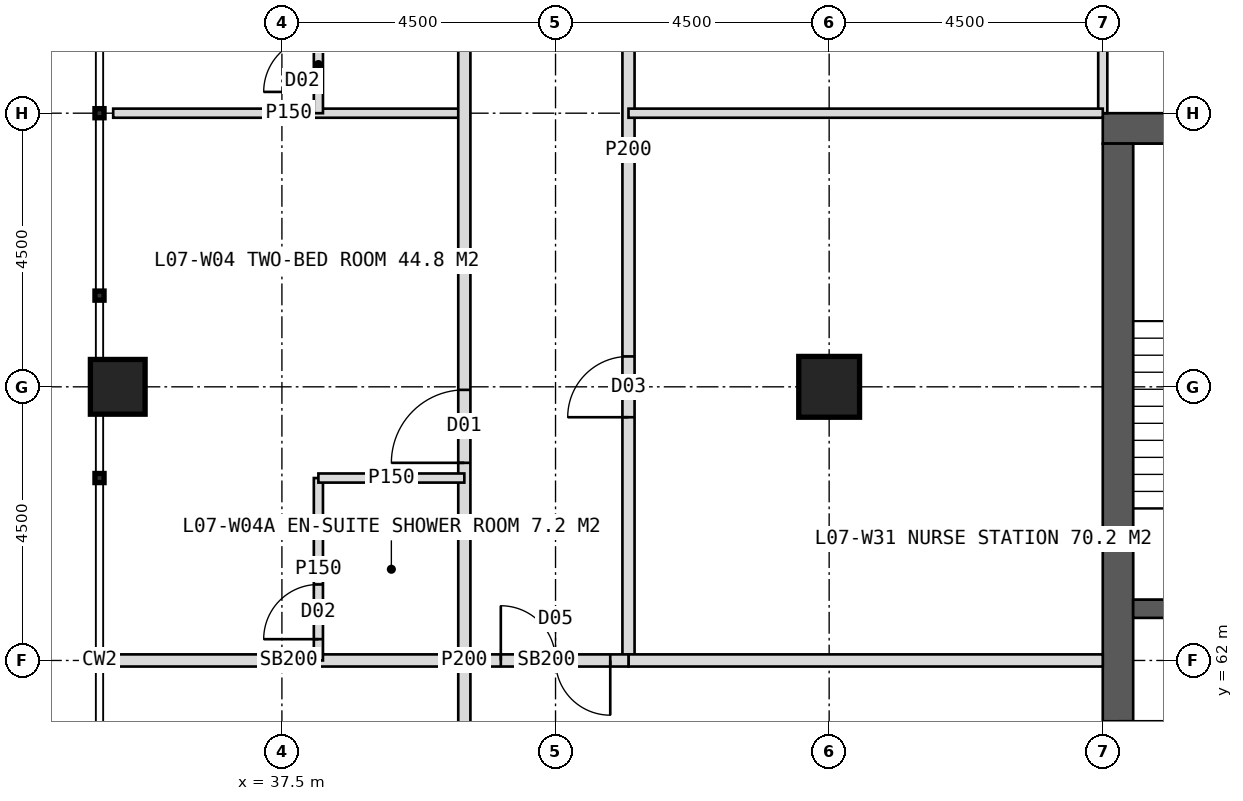
"""IFC4 building model, lengths in metres.
Left out: names, types, materials, properties, quantities, classifications, styles, units other than length and angle.
Written with IfcOpenShell. Run it as: python <this file> out.ifc"""

import sys

from ifc_helpers import new_model, si_unit, direction, frame, frame_2d, origin, origin_2d, place, context, subcontext, project, spatial, rectangle, hollow_rectangle, extrude, element, fill, save


model = new_model("IFC4")
c1 = context("Model", 3, precision=1e-05, world=origin(), true_north=direction((0.0, 1.0)))
c2 = subcontext(c1, "Body", "Model", "MODEL_VIEW")
j1 = project(units=[si_unit("LENGTHUNIT", "METRE"), si_unit("PLANEANGLEUNIT", "RADIAN")], contexts=[c1])
p1 = place(None, origin())
s1 = spatial("IfcSite", under=j1, at=p1, CompositionType="ELEMENT")
p2 = place(p1, origin())
s2 = spatial("IfcBuilding", under=s1, at=p2, CompositionType="ELEMENT")
p3 = place(p2, frame((0.0, 0.0, 35.0)))
s3 = spatial("IfcBuildingStorey", under=s2, at=p3, CompositionType="ELEMENT", Elevation=35.0)
p4 = place(p3, frame((51.0, 70.75, 0.0), z_axis=(0.0, 0.0, 1.0), x_axis=(1.0, 0.0, 0.0)))
e1 = element("IfcWall", 1, at=p4, inside=s3, PredefinedType="SHEAR", context=c2, shape_type="SweptSolid", body=[
    extrude(rectangle(XDim=18.0, YDim=0.5, at=frame_2d((9.0, 0.0))), origin(), (0.0, 0.0, 1.0), 4.0),
])
p5 = place(p4, frame((8.1, 0.0, 0.0)))
e2 = element("IfcOpeningElement", 2, at=p5, cuts=e1, PredefinedType="OPENING", context=c2, shape_type="SweptSolid", body=[
    extrude(rectangle(XDim=1.8, YDim=2.2, at=frame_2d((0.9, 1.1))), frame((0.0, 0.26, 0.0), z_axis=(0.0, -1.0, 0.0), x_axis=(1.0, 0.0, 0.0)), (0.0, 0.0, 1.0), 0.52),
])
p6 = place(p3, frame((51.25, 53.5, 0.0), z_axis=(0.0, 0.0, 1.0), x_axis=(0.0, 1.0, 0.0)))
e3 = element("IfcWall", 3, at=p6, inside=s3, PredefinedType="SHEAR", context=c2, shape_type="SweptSolid", body=[
    extrude(rectangle(XDim=17.0, YDim=0.5, at=frame_2d((8.5, 0.0))), origin(), (0.0, 0.0, 1.0), 4.0),
])
p7 = place(p6, frame((6.0, 0.0, 0.0)))
e4 = element("IfcOpeningElement", 4, at=p7, cuts=e3, PredefinedType="OPENING", context=c2, shape_type="SweptSolid", body=[
    extrude(rectangle(XDim=1.5, YDim=2.2, at=frame_2d((0.75, 1.1))), frame((0.0, 0.26, 0.0), z_axis=(0.0, -1.0, 0.0), x_axis=(1.0, 0.0, 0.0)), (0.0, 0.0, 1.0), 0.52),
])
p8 = place(p3, frame((51.5, 62.85, 0.0), z_axis=(0.0, 0.0, 1.0), x_axis=(1.0, 0.0, 0.0)))
e5 = element("IfcWall", 5, at=p8, inside=s3, PredefinedType="SHEAR", context=c2, shape_type="SweptSolid", body=[
    extrude(rectangle(XDim=3.3, YDim=0.3, at=frame_2d((1.65, 0.0))), origin(), (0.0, 0.0, 1.0), 4.0),
])
p9 = place(p8, frame((1.05, 0.0, 0.0)))
e6 = element("IfcOpeningElement", 6, at=p9, cuts=e5, PredefinedType="OPENING", context=c2, shape_type="SweptSolid", body=[
    extrude(rectangle(XDim=1.2, YDim=2.1, at=frame_2d((0.6, 1.05))), frame((0.0, 0.16, 0.0), z_axis=(0.0, -1.0, 0.0), x_axis=(1.0, 0.0, 0.0)), (0.0, 0.0, 1.0), 0.32),
])
p10 = place(p3, frame((46.5, 66.5, 0.0), z_axis=(0.0, 0.0, 1.0), x_axis=(1.0, 0.0, 0.0)))
e7 = element("IfcColumn", 7, at=p10, inside=s3, PredefinedType="COLUMN", context=c2, shape_type="SweptSolid", body=[
    extrude(hollow_rectangle(XDim=1.0, YDim=1.0, WallThickness=0.1, at=origin_2d()), origin(), (0.0, 0.0, 1.0), 4.0),
])
p11 = place(p3, frame((34.8, 66.5, 0.0), z_axis=(0.0, 0.0, 1.0), x_axis=(1.0, 0.0, 0.0)))
e8 = element("IfcColumn", 8, at=p11, inside=s3, PredefinedType="COLUMN", context=c2, shape_type="SweptSolid", body=[
    extrude(hollow_rectangle(XDim=0.9, YDim=0.9, WallThickness=0.08, at=origin_2d()), origin(), (0.0, 0.0, 1.0), 4.0),
])
p12 = place(p3, frame((51.0, 71.0, 0.0), z_axis=(0.0, 0.0, 1.0), x_axis=(0.0, 1.0, 0.0)))
e9 = element("IfcWall", 9, at=p12, inside=s3, PredefinedType="PARTITIONING", context=c2, shape_type="SweptSolid", body=[
    extrude(rectangle(XDim=7.8, YDim=0.15, at=frame_2d((3.9, 0.0))), origin(), (0.0, 0.0, 1.0), 3.75),
])
p13 = place(p3, frame((40.5, 62.0, 0.0), z_axis=(0.0, 0.0, 1.0), x_axis=(-1.0, 0.0, 0.0)))
e10 = element("IfcWall", 10, at=p13, inside=s3, PredefinedType="SOLIDWALL", context=c2, shape_type="SweptSolid", body=[
    extrude(rectangle(XDim=5.775, YDim=0.2, at=frame_2d((2.887, 0.0))), origin(), (0.0, 0.0, 1.0), 2.75),
])
p14 = place(p3, frame((40.5, 71.0, 0.0), z_axis=(0.0, 0.0, 1.0), x_axis=(-1.0, 0.0, 0.0)))
e11 = element("IfcWall", 11, at=p14, inside=s3, PredefinedType="PARTITIONING", context=c2, shape_type="SweptSolid", body=[
    extrude(rectangle(XDim=5.775, YDim=0.15, at=frame_2d((2.887, 0.0))), origin(), (0.0, 0.0, 1.0), 3.75),
])
p15 = place(p3, frame((40.5, 42.5, 0.0), z_axis=(0.0, 0.0, 1.0), x_axis=(0.0, 1.0, 0.0)))
e12 = element("IfcWall", 12, at=p15, inside=s3, PredefinedType="PARTITIONING", context=c2, shape_type="SweptSolid", body=[
    extrude(rectangle(XDim=39.0, YDim=0.2, at=frame_2d((19.5, 0.0))), origin(), (0.0, 0.0, 1.0), 3.75),
])
p16 = place(p15, frame((3.25, 0.0, 0.0)))
e13 = element("IfcOpeningElement", 13, at=p16, cuts=e12, PredefinedType="OPENING", context=c2, shape_type="SweptSolid", body=[
    extrude(rectangle(XDim=1.2, YDim=2.2, at=frame_2d((0.6, 1.1))), frame((0.0, 0.11, 0.0), z_axis=(0.0, -1.0, 0.0), x_axis=(1.0, 0.0, 0.0)), (0.0, 0.0, 1.0), 0.22),
])
p17 = place(p15, frame((10.15, 0.0, 0.0)))
e14 = element("IfcOpeningElement", 14, at=p17, cuts=e12, PredefinedType="OPENING", context=c2, shape_type="SweptSolid", body=[
    extrude(rectangle(XDim=1.2, YDim=2.2, at=frame_2d((0.6, 1.1))), frame((0.0, 0.11, 0.0), z_axis=(0.0, -1.0, 0.0), x_axis=(1.0, 0.0, 0.0)), (0.0, 0.0, 1.0), 0.22),
])
p18 = place(p15, frame((16.15, 0.0, 0.0)))
e15 = element("IfcOpeningElement", 15, at=p18, cuts=e12, PredefinedType="OPENING", context=c2, shape_type="SweptSolid", body=[
    extrude(rectangle(XDim=1.2, YDim=2.2, at=frame_2d((0.6, 1.1))), frame((0.0, 0.11, 0.0), z_axis=(0.0, -1.0, 0.0), x_axis=(1.0, 0.0, 0.0)), (0.0, 0.0, 1.0), 0.22),
])
p19 = place(p15, frame((22.75, 0.0, 0.0)))
e16 = element("IfcOpeningElement", 16, at=p19, cuts=e12, PredefinedType="OPENING", context=c2, shape_type="SweptSolid", body=[
    extrude(rectangle(XDim=1.2, YDim=2.2, at=frame_2d((0.6, 1.1))), frame((0.0, 0.11, 0.0), z_axis=(0.0, -1.0, 0.0), x_axis=(1.0, 0.0, 0.0)), (0.0, 0.0, 1.0), 0.22),
])
p20 = place(p15, frame((31.15, 0.0, 0.0)))
e17 = element("IfcOpeningElement", 17, at=p20, cuts=e12, PredefinedType="OPENING", context=c2, shape_type="SweptSolid", body=[
    extrude(rectangle(XDim=1.2, YDim=2.2, at=frame_2d((0.6, 1.1))), frame((0.0, 0.11, 0.0), z_axis=(0.0, -1.0, 0.0), x_axis=(1.0, 0.0, 0.0)), (0.0, 0.0, 1.0), 0.22),
])
p21 = place(p3, frame((38.1, 62.0, 0.0), z_axis=(0.0, 0.0, 1.0), x_axis=(0.0, 1.0, 0.0)))
e18 = element("IfcWall", 18, at=p21, inside=s3, PredefinedType="PARTITIONING", context=c2, shape_type="SweptSolid", body=[
    extrude(rectangle(XDim=3.0, YDim=0.15, at=frame_2d((1.5, 0.0))), origin(), (0.0, 0.0, 1.0), 3.75),
])
p22 = place(p21, frame((0.35, 0.0, 0.0)))
e19 = element("IfcOpeningElement", 19, at=p22, cuts=e18, PredefinedType="OPENING", context=c2, shape_type="SweptSolid", body=[
    extrude(rectangle(XDim=0.9, YDim=2.1, at=frame_2d((0.45, 1.05))), frame((0.0, 0.085, 0.0), z_axis=(0.0, -1.0, 0.0), x_axis=(1.0, 0.0, 0.0)), (0.0, 0.0, 1.0), 0.17),
])
p23 = place(p3, frame((40.5, 65.0, 0.0), z_axis=(0.0, 0.0, 1.0), x_axis=(-1.0, 0.0, 0.0)))
e20 = element("IfcWall", 20, at=p23, inside=s3, PredefinedType="PARTITIONING", context=c2, shape_type="SweptSolid", body=[
    extrude(rectangle(XDim=2.4, YDim=0.15, at=frame_2d((1.2, 0.0))), origin(), (0.0, 0.0, 1.0), 3.75),
])
p24 = place(p3, frame((38.1, 71.0, 0.0), z_axis=(0.0, 0.0, 1.0), x_axis=(0.0, 1.0, 0.0)))
e21 = element("IfcWall", 21, at=p24, inside=s3, PredefinedType="PARTITIONING", context=c2, shape_type="SweptSolid", body=[
    extrude(rectangle(XDim=2.4, YDim=0.15, at=frame_2d((1.2, 0.0))), origin(), (0.0, 0.0, 1.0), 3.75),
])
p25 = place(p24, frame((0.35, 0.0, 0.0)))
e22 = element("IfcOpeningElement", 22, at=p25, cuts=e21, PredefinedType="OPENING", context=c2, shape_type="SweptSolid", body=[
    extrude(rectangle(XDim=0.9, YDim=2.1, at=frame_2d((0.45, 1.05))), frame((0.0, 0.085, 0.0), z_axis=(0.0, -1.0, 0.0), x_axis=(1.0, 0.0, 0.0)), (0.0, 0.0, 1.0), 0.17),
])
p26 = place(p3, frame((43.2, 62.0, 0.0), z_axis=(0.0, 0.0, 1.0), x_axis=(0.0, 1.0, 0.0)))
e23 = element("IfcWall", 23, at=p26, inside=s3, PredefinedType="PARTITIONING", context=c2, shape_type="SweptSolid", body=[
    extrude(rectangle(XDim=16.8, YDim=0.2, at=frame_2d((8.4, 0.0))), origin(), (0.0, 0.0, 1.0), 3.75),
])
p27 = place(p26, frame((4.0, 0.0, 0.0)))
e24 = element("IfcOpeningElement", 24, at=p27, cuts=e23, PredefinedType="OPENING", context=c2, shape_type="SweptSolid", body=[
    extrude(rectangle(XDim=1.0, YDim=2.1, at=frame_2d((0.5, 1.05))), frame((0.0, 0.11, 0.0), z_axis=(0.0, -1.0, 0.0), x_axis=(1.0, 0.0, 0.0)), (0.0, 0.0, 1.0), 0.22),
])
p28 = place(p26, frame((12.4, 0.0, 0.0)))
e25 = element("IfcOpeningElement", 25, at=p28, cuts=e23, PredefinedType="OPENING", context=c2, shape_type="SweptSolid", body=[
    extrude(rectangle(XDim=1.0, YDim=2.1, at=frame_2d((0.5, 1.05))), frame((0.0, 0.11, 0.0), z_axis=(0.0, -1.0, 0.0), x_axis=(1.0, 0.0, 0.0)), (0.0, 0.0, 1.0), 0.22),
])
p29 = place(p3, frame((51.0, 62.0, 0.0), z_axis=(0.0, 0.0, 1.0), x_axis=(-1.0, 0.0, 0.0)))
e26 = element("IfcWall", 26, at=p29, inside=s3, PredefinedType="SOLIDWALL", context=c2, shape_type="SweptSolid", body=[
    extrude(rectangle(XDim=7.8, YDim=0.2, at=frame_2d((3.9, 0.0))), origin(), (0.0, 0.0, 1.0), 2.75),
])
p30 = place(p3, frame((51.0, 71.0, 0.0), z_axis=(0.0, 0.0, 1.0), x_axis=(-1.0, 0.0, 0.0)))
e27 = element("IfcWall", 27, at=p30, inside=s3, PredefinedType="PARTITIONING", context=c2, shape_type="SweptSolid", body=[
    extrude(rectangle(XDim=7.8, YDim=0.15, at=frame_2d((3.9, 0.0))), origin(), (0.0, 0.0, 1.0), 3.75),
])
p31 = place(p3, frame((43.2, 62.0, 0.0), z_axis=(0.0, 0.0, 1.0), x_axis=(-1.0, 0.0, 0.0)))
e28 = element("IfcWall", 28, at=p31, inside=s3, PredefinedType="SOLIDWALL", context=c2, shape_type="SweptSolid", body=[
    extrude(rectangle(XDim=2.7, YDim=0.2, at=frame_2d((1.35, 0.0))), origin(), (0.0, 0.0, 1.0), 2.75),
])
p32 = place(p31, frame((0.3, 0.0, 0.0)))
e29 = element("IfcOpeningElement", 29, at=p32, cuts=e28, PredefinedType="OPENING", context=c2, shape_type="SweptSolid", body=[
    extrude(rectangle(XDim=1.8, YDim=2.2, at=frame_2d((0.9, 1.1))), frame((0.0, 0.11, 0.0), z_axis=(0.0, -1.0, 0.0), x_axis=(1.0, 0.0, 0.0)), (0.0, 0.0, 1.0), 0.22),
])
p33 = place(p19, origin())
e30 = element("IfcDoor", 30, at=p33, inside=s3, OperationType="SINGLE_SWING_LEFT", PredefinedType="DOOR", context=c2, shape_type="SweptSolid", body=[
    extrude(rectangle(XDim=1.2, YDim=2.2, at=frame_2d((0.6, 1.1))), frame((0.0, 0.025, 0.0), z_axis=(0.0, -1.0, 0.0), x_axis=(1.0, 0.0, 0.0)), (0.0, 0.0, 1.0), 0.05),
])
fill(e16, e30)
p34 = place(p22, origin())
e31 = element("IfcDoor", 31, at=p34, inside=s3, OperationType="SINGLE_SWING_LEFT", PredefinedType="DOOR", context=c2, shape_type="SweptSolid", body=[
    extrude(rectangle(XDim=0.9, YDim=2.1, at=frame_2d((0.45, 1.05))), frame((0.0, 0.025, 0.0), z_axis=(0.0, -1.0, 0.0), x_axis=(1.0, 0.0, 0.0)), (0.0, 0.0, 1.0), 0.05),
])
fill(e19, e31)
p35 = place(p25, origin())
e32 = element("IfcDoor", 32, at=p35, inside=s3, OperationType="SINGLE_SWING_LEFT", PredefinedType="DOOR", context=c2, shape_type="SweptSolid", body=[
    extrude(rectangle(XDim=0.9, YDim=2.1, at=frame_2d((0.45, 1.05))), frame((0.0, 0.025, 0.0), z_axis=(0.0, -1.0, 0.0), x_axis=(1.0, 0.0, 0.0)), (0.0, 0.0, 1.0), 0.05),
])
fill(e22, e32)
p36 = place(p27, origin())
e33 = element("IfcDoor", 33, at=p36, inside=s3, OperationType="SINGLE_SWING_LEFT", PredefinedType="DOOR", context=c2, shape_type="SweptSolid", body=[
    extrude(rectangle(XDim=1.0, YDim=2.1, at=frame_2d((0.5, 1.05))), frame((0.0, 0.025, 0.0), z_axis=(0.0, -1.0, 0.0), x_axis=(1.0, 0.0, 0.0)), (0.0, 0.0, 1.0), 0.05),
])
fill(e24, e33)
p37 = place(p32, origin())
e34 = element("IfcDoor", 34, at=p37, inside=s3, OperationType="DOUBLE_DOOR_DOUBLE_SWING", PredefinedType="DOOR", context=c2, shape_type="SweptSolid", body=[
    extrude(rectangle(XDim=1.8, YDim=2.2, at=frame_2d((0.9, 1.1))), frame((0.0, 0.025, 0.0), z_axis=(0.0, -1.0, 0.0), x_axis=(1.0, 0.0, 0.0)), (0.0, 0.0, 1.0), 0.05),
])
fill(e29, e34)
save(model, sys.argv[1])
